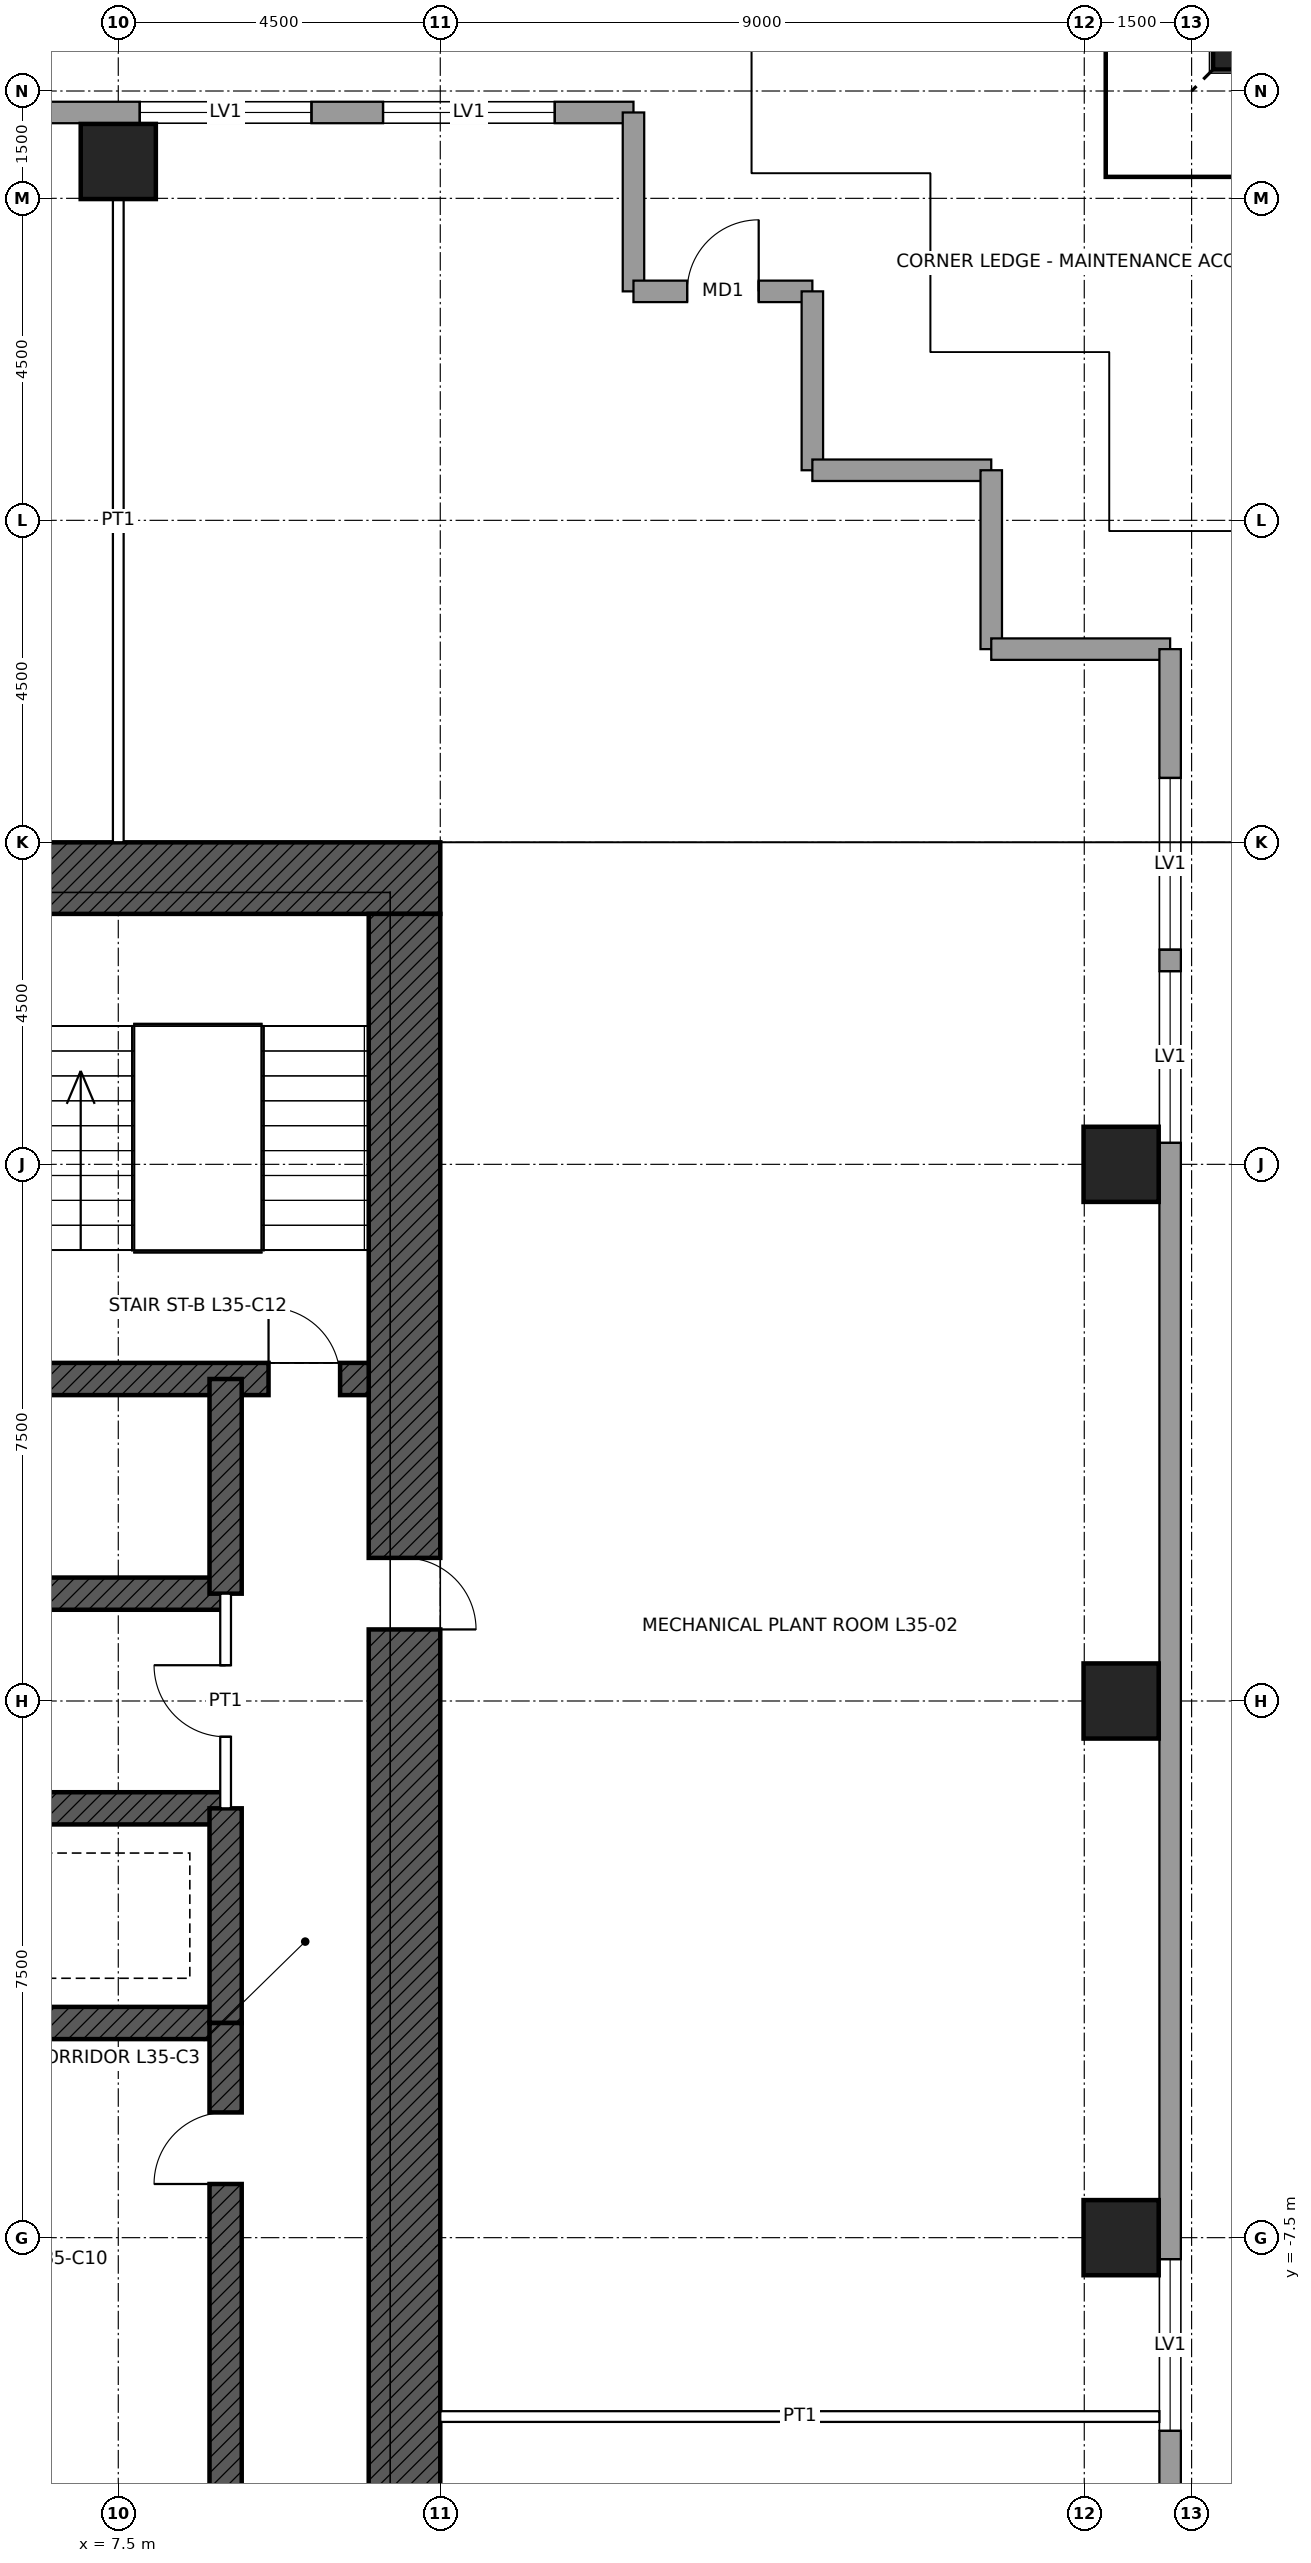
"""IFC4 building model, lengths in metres.
Left out: names, types, materials, properties, quantities, classifications, styles, units other than length and angle.
Written with IfcOpenShell. Run it as: python <this file> out.ifc"""

import sys

from ifc_helpers import new_model, si_unit, direction, frame, frame_2d, origin, origin_2d, place, context, subcontext, project, spatial, rectangle, hollow_rectangle, extrude, clip, halfspace, element, fill, save


model = new_model("IFC4")
c1 = context("Model", 3, precision=1e-05, world=origin(), true_north=direction((0.0, 1.0)))
c2 = subcontext(c1, "Body", "Model", "MODEL_VIEW")
j1 = project(units=[si_unit("LENGTHUNIT", "METRE"), si_unit("PLANEANGLEUNIT", "RADIAN")], contexts=[c1])
p1 = place(None, origin())
s1 = spatial("IfcSite", under=j1, at=p1, CompositionType="ELEMENT")
p2 = place(p1, origin())
s2 = spatial("IfcBuilding", under=s1, at=p2, CompositionType="ELEMENT")
p3 = place(p2, frame((0.0, 0.0, 171.9)))
s3 = spatial("IfcBuildingStorey", under=s2, at=p3, CompositionType="ELEMENT", Elevation=171.9)
p4 = place(p3, frame((24.0, 24.0, 0.0), z_axis=(-0.235702260396, -0.235702260396, 0.942809041582), x_axis=(0.707106781187, -0.707106781187, 0.0)))
e1 = element("IfcColumn", 1, at=p4, inside=s3, PredefinedType="COLUMN", context=c2, shape_type="Clipping", body=[
    clip(clip(extrude(hollow_rectangle(XDim=2.4, YDim=2.4, WallThickness=0.12, at=origin_2d()), origin(), (0.0, 0.0, 1.0), 6.364), halfspace(frame((0.0, 0.0, 0.425)), True)), halfspace(frame((0.0, 0.0, 5.939)), False)),
])
p5 = place(p3, frame((-12.0, 11.5, 0.0), z_axis=(0.0, 0.0, 1.0), x_axis=(1.0, 0.0, 0.0)))
e2 = element("IfcWall", 2, at=p5, inside=s3, PredefinedType="SHEAR", context=c2, shape_type="SweptSolid", body=[
    extrude(rectangle(XDim=24.0, YDim=1.0, at=frame_2d((12.0, 0.0))), origin(), (0.0, 0.0, 1.0), 6.0),
])
p6 = place(p5, frame((6.25, 0.0, 0.0)))
e3 = element("IfcOpeningElement", 3, at=p6, cuts=e2, PredefinedType="OPENING", context=c2, shape_type="SweptSolid", body=[
    extrude(rectangle(XDim=1.0, YDim=2.4, at=frame_2d((0.5, 1.2))), frame((0.0, 0.51, 0.0), z_axis=(0.0, -1.0, 0.0), x_axis=(1.0, 0.0, 0.0)), (0.0, 0.0, 1.0), 1.02),
])
p7 = place(p5, frame((16.75, 0.0, 0.0)))
e4 = element("IfcOpeningElement", 4, at=p7, cuts=e2, PredefinedType="OPENING", context=c2, shape_type="SweptSolid", body=[
    extrude(rectangle(XDim=1.0, YDim=2.4, at=frame_2d((0.5, 1.2))), frame((0.0, 0.51, 0.0), z_axis=(0.0, -1.0, 0.0), x_axis=(1.0, 0.0, 0.0)), (0.0, 0.0, 1.0), 1.02),
])
p8 = place(p3, frame((11.5, 11.0, 0.0), z_axis=(0.0, 0.0, 1.0), x_axis=(0.0, -1.0, 0.0)))
e5 = element("IfcWall", 5, at=p8, inside=s3, PredefinedType="SHEAR", context=c2, shape_type="SweptSolid", body=[
    extrude(rectangle(XDim=22.0, YDim=1.0, at=frame_2d((11.0, 0.0))), origin(), (0.0, 0.0, 1.0), 6.0),
])
p9 = place(p8, frame((9.0, 0.0, 0.0)))
e6 = element("IfcOpeningElement", 6, at=p9, cuts=e5, PredefinedType="OPENING", context=c2, shape_type="SweptSolid", body=[
    extrude(rectangle(XDim=1.0, YDim=2.4, at=frame_2d((0.5, 1.2))), frame((0.0, 0.51, 0.0), z_axis=(0.0, -1.0, 0.0), x_axis=(1.0, 0.0, 0.0)), (0.0, 0.0, 1.0), 1.02),
])
p10 = place(p3, frame((-11.0, 4.5, 0.0), z_axis=(0.0, 0.0, 1.0), x_axis=(1.0, 0.0, 0.0)))
e7 = element("IfcWall", 7, at=p10, inside=s3, PredefinedType="SHEAR", context=c2, shape_type="SweptSolid", body=[
    extrude(rectangle(XDim=22.0, YDim=0.45, at=frame_2d((11.0, 0.0))), origin(), (0.0, 0.0, 1.0), 6.0),
])
p11 = place(p10, frame((0.4, 0.0, 0.0)))
e8 = element("IfcOpeningElement", 8, at=p11, cuts=e7, PredefinedType="OPENING", context=c2, shape_type="SweptSolid", body=[
    extrude(rectangle(XDim=1.0, YDim=2.1, at=frame_2d((0.5, 1.05))), frame((0.0, 0.235, 0.0), z_axis=(0.0, -1.0, 0.0), x_axis=(1.0, 0.0, 0.0)), (0.0, 0.0, 1.0), 0.47),
])
p12 = place(p10, frame((20.6, 0.0, 0.0)))
e9 = element("IfcOpeningElement", 9, at=p12, cuts=e7, PredefinedType="OPENING", context=c2, shape_type="SweptSolid", body=[
    extrude(rectangle(XDim=1.0, YDim=2.1, at=frame_2d((0.5, 1.05))), frame((0.0, 0.235, 0.0), z_axis=(0.0, -1.0, 0.0), x_axis=(1.0, 0.0, 0.0)), (0.0, 0.0, 1.0), 0.47),
])
for number, where, z_axis, x_axis in (
    (10, (-9.0, 1.5, 0.0), (0.0, 0.0, 1.0), (1.0, 0.0, 0.0)),
    (11, (-9.0, -1.5, 0.0), (0.0, 0.0, 1.0), (1.0, 0.0, 0.0)),
    (12, (-9.0, -4.5, 0.0), (0.0, 0.0, 1.0), (1.0, 0.0, 0.0)),
):
    element("IfcWall", number, at=place(p3, frame(where, z_axis=z_axis, x_axis=x_axis)), inside=s3, PredefinedType="SHEAR", context=c2, shape_type="SweptSolid", body=[
        extrude(rectangle(XDim=18.0, YDim=0.45, at=frame_2d((9.0, 0.0))), origin(), (0.0, 0.0, 1.0), 6.0),
    ])
for number, where, z_axis, x_axis in (
    (13, (9.0, 1.5, 0.0), (0.0, 0.0, 1.0), (0.0, 1.0, 0.0)),
    (14, (9.0, -4.5, 0.0), (0.0, 0.0, 1.0), (0.0, 1.0, 0.0)),
):
    element("IfcWall", number, at=place(p3, frame(where, z_axis=z_axis, x_axis=x_axis)), inside=s3, PredefinedType="SHEAR", context=c2, shape_type="SweptSolid", body=[
        extrude(rectangle(XDim=3.0, YDim=0.45, at=frame_2d((1.5, 0.0))), origin(), (0.0, 0.0, 1.0), 6.0),
    ])
p13 = place(p3, frame((9.0, -11.0, 0.0), z_axis=(0.0, 0.0, 1.0), x_axis=(0.0, 1.0, 0.0)))
e15 = element("IfcWall", 15, at=p13, inside=s3, PredefinedType="SHEAR", context=c2, shape_type="SweptSolid", body=[
    extrude(rectangle(XDim=6.5, YDim=0.45, at=frame_2d((3.25, 0.0))), origin(), (0.0, 0.0, 1.0), 6.0),
])
p14 = place(p13, frame((4.25, 0.0, 0.0)))
e16 = element("IfcOpeningElement", 16, at=p14, cuts=e15, PredefinedType="OPENING", context=c2, shape_type="SweptSolid", body=[
    extrude(rectangle(XDim=1.0, YDim=2.1, at=frame_2d((0.5, 1.05))), frame((0.0, 0.235, 0.0), z_axis=(0.0, -1.0, 0.0), x_axis=(1.0, 0.0, 0.0)), (0.0, 0.0, 1.0), 0.47),
])
for number, where, z_axis, x_axis in (
    (17, (7.5, 21.515, -0.25), (0.0, 0.0, 1.0), (1.0, 0.0, 0.0)),
    (18, (21.515, 7.5, -0.25), (0.0, 0.0, 1.0), (1.0, 0.0, 0.0)),
    (19, (21.515, 0.0, -0.25), (0.0, 0.0, 1.0), (1.0, 0.0, 0.0)),
    (20, (21.515, -7.5, -0.25), (0.0, 0.0, 1.0), (1.0, 0.0, 0.0)),
):
    element("IfcColumn", number, at=place(p3, frame(where, z_axis=z_axis, x_axis=x_axis)), inside=s3, PredefinedType="COLUMN", context=c2, shape_type="SweptSolid", body=[
        extrude(hollow_rectangle(XDim=1.05, YDim=1.05, WallThickness=0.07, at=origin_2d()), origin(), (0.0, 0.0, 1.0), 6.25),
    ])
p15 = place(p3, frame((-14.7, 22.2, 0.0), z_axis=(0.0, 0.0, 1.0), x_axis=(1.0, 0.0, 0.0)))
e21 = element("IfcWall", 21, at=p15, inside=s3, PredefinedType="SOLIDWALL", context=c2, shape_type="SweptSolid", body=[
    extrude(rectangle(XDim=29.4, YDim=0.3, at=frame_2d((14.7, 0.0))), origin(), (0.0, 0.0, 1.0), 5.85),
])
p16 = place(p15, frame((1.8, 0.0, 2.1)))
e22 = element("IfcOpeningElement", 22, at=p16, cuts=e21, PredefinedType="OPENING", context=c2, shape_type="SweptSolid", body=[
    extrude(rectangle(XDim=2.4, YDim=2.4, at=frame_2d((1.2, 1.2))), frame((0.0, 0.16, 0.0), z_axis=(0.0, -1.0, 0.0), x_axis=(1.0, 0.0, 0.0)), (0.0, 0.0, 1.0), 0.32),
])
p17 = place(p15, frame((4.5, 0.0, 2.1)))
e23 = element("IfcOpeningElement", 23, at=p17, cuts=e21, PredefinedType="OPENING", context=c2, shape_type="SweptSolid", body=[
    extrude(rectangle(XDim=2.4, YDim=2.4, at=frame_2d((1.2, 1.2))), frame((0.0, 0.16, 0.0), z_axis=(0.0, -1.0, 0.0), x_axis=(1.0, 0.0, 0.0)), (0.0, 0.0, 1.0), 0.32),
])
p18 = place(p15, frame((22.5, 0.0, 2.1)))
e24 = element("IfcOpeningElement", 24, at=p18, cuts=e21, PredefinedType="OPENING", context=c2, shape_type="SweptSolid", body=[
    extrude(rectangle(XDim=2.4, YDim=2.4, at=frame_2d((1.2, 1.2))), frame((0.0, 0.16, 0.0), z_axis=(0.0, -1.0, 0.0), x_axis=(1.0, 0.0, 0.0)), (0.0, 0.0, 1.0), 0.32),
])
p19 = place(p15, frame((25.9, 0.0, 2.1)))
e25 = element("IfcOpeningElement", 25, at=p19, cuts=e21, PredefinedType="OPENING", context=c2, shape_type="SweptSolid", body=[
    extrude(rectangle(XDim=2.4, YDim=2.4, at=frame_2d((1.2, 1.2))), frame((0.0, 0.16, 0.0), z_axis=(0.0, -1.0, 0.0), x_axis=(1.0, 0.0, 0.0)), (0.0, 0.0, 1.0), 0.32),
])
p20 = place(p3, frame((14.7, 22.2, 0.0), z_axis=(0.0, 0.0, 1.0), x_axis=(0.0, -1.0, 0.0)))
e26 = element("IfcWall", 26, at=p20, inside=s3, PredefinedType="SOLIDWALL", context=c2, shape_type="SweptSolid", body=[
    extrude(rectangle(XDim=2.5, YDim=0.3, at=frame_2d((1.25, 0.0))), origin(), (0.0, 0.0, 1.0), 5.85),
])
p21 = place(p3, frame((14.7, 19.7, 0.0), z_axis=(0.0, 0.0, 1.0), x_axis=(1.0, 0.0, 0.0)))
e27 = element("IfcWall", 27, at=p21, inside=s3, PredefinedType="SOLIDWALL", context=c2, shape_type="SweptSolid", body=[
    extrude(rectangle(XDim=2.5, YDim=0.3, at=frame_2d((1.25, 0.0))), origin(), (0.0, 0.0, 1.0), 5.85),
])
p22 = place(p21, frame((0.75, 0.0, 0.0)))
e28 = element("IfcOpeningElement", 28, at=p22, cuts=e27, PredefinedType="OPENING", context=c2, shape_type="SweptSolid", body=[
    extrude(rectangle(XDim=1.0, YDim=2.1, at=frame_2d((0.5, 1.05))), frame((0.0, 0.16, 0.0), z_axis=(0.0, -1.0, 0.0), x_axis=(1.0, 0.0, 0.0)), (0.0, 0.0, 1.0), 0.32),
])
for number, where, z_axis, x_axis in (
    (29, (17.2, 19.7, 0.0), (0.0, 0.0, 1.0), (0.0, -1.0, 0.0)),
    (30, (17.2, 17.2, 0.0), (0.0, 0.0, 1.0), (1.0, 0.0, 0.0)),
    (31, (19.7, 17.2, 0.0), (0.0, 0.0, 1.0), (0.0, -1.0, 0.0)),
    (32, (19.7, 14.7, 0.0), (0.0, 0.0, 1.0), (1.0, 0.0, 0.0)),
):
    element("IfcWall", number, at=place(p3, frame(where, z_axis=z_axis, x_axis=x_axis)), inside=s3, PredefinedType="SOLIDWALL", context=c2, shape_type="SweptSolid", body=[
        extrude(rectangle(XDim=2.5, YDim=0.3, at=frame_2d((1.25, 0.0))), origin(), (0.0, 0.0, 1.0), 5.85),
    ])
p23 = place(p3, frame((22.2, 14.7, 0.0), z_axis=(0.0, 0.0, 1.0), x_axis=(0.0, -1.0, 0.0)))
e33 = element("IfcWall", 33, at=p23, inside=s3, PredefinedType="SOLIDWALL", context=c2, shape_type="SweptSolid", body=[
    extrude(rectangle(XDim=29.4, YDim=0.3, at=frame_2d((14.7, 0.0))), origin(), (0.0, 0.0, 1.0), 5.85),
])
p24 = place(p23, frame((1.8, 0.0, 2.1)))
e34 = element("IfcOpeningElement", 34, at=p24, cuts=e33, PredefinedType="OPENING", context=c2, shape_type="SweptSolid", body=[
    extrude(rectangle(XDim=2.4, YDim=2.4, at=frame_2d((1.2, 1.2))), frame((0.0, 0.16, 0.0), z_axis=(0.0, -1.0, 0.0), x_axis=(1.0, 0.0, 0.0)), (0.0, 0.0, 1.0), 0.32),
])
p25 = place(p23, frame((4.5, 0.0, 2.1)))
e35 = element("IfcOpeningElement", 35, at=p25, cuts=e33, PredefinedType="OPENING", context=c2, shape_type="SweptSolid", body=[
    extrude(rectangle(XDim=2.4, YDim=2.4, at=frame_2d((1.2, 1.2))), frame((0.0, 0.16, 0.0), z_axis=(0.0, -1.0, 0.0), x_axis=(1.0, 0.0, 0.0)), (0.0, 0.0, 1.0), 0.32),
])
p26 = place(p23, frame((22.5, 0.0, 2.1)))
e36 = element("IfcOpeningElement", 36, at=p26, cuts=e33, PredefinedType="OPENING", context=c2, shape_type="SweptSolid", body=[
    extrude(rectangle(XDim=2.4, YDim=2.4, at=frame_2d((1.2, 1.2))), frame((0.0, 0.16, 0.0), z_axis=(0.0, -1.0, 0.0), x_axis=(1.0, 0.0, 0.0)), (0.0, 0.0, 1.0), 0.32),
])
p27 = place(p23, frame((25.9, 0.0, 2.1)))
e37 = element("IfcOpeningElement", 37, at=p27, cuts=e33, PredefinedType="OPENING", context=c2, shape_type="SweptSolid", body=[
    extrude(rectangle(XDim=2.4, YDim=2.4, at=frame_2d((1.2, 1.2))), frame((0.0, 0.16, 0.0), z_axis=(0.0, -1.0, 0.0), x_axis=(1.0, 0.0, 0.0)), (0.0, 0.0, 1.0), 0.32),
])
p28 = place(p3, frame((7.5, 12.0, 0.0), z_axis=(0.0, 0.0, 1.0), x_axis=(0.0, 1.0, 0.0)))
e38 = element("IfcWall", 38, at=p28, inside=s3, PredefinedType="PARTITIONING", context=c2, shape_type="SweptSolid", body=[
    extrude(rectangle(XDim=8.99, YDim=0.15, at=frame_2d((4.495, 0.0))), origin(), (0.0, 0.0, 1.0), 5.85),
])
p29 = place(p3, frame((12.0, -10.0, 0.0), z_axis=(0.0, 0.0, 1.0), x_axis=(1.0, 0.0, 0.0)))
e39 = element("IfcWall", 39, at=p29, inside=s3, PredefinedType="PARTITIONING", context=c2, shape_type="SweptSolid", body=[
    extrude(rectangle(XDim=10.05, YDim=0.15, at=frame_2d((5.025, 0.0))), origin(), (0.0, 0.0, 1.0), 5.85),
])
p30 = place(p3, frame((9.0, -1.5, 0.0), z_axis=(0.0, 0.0, 1.0), x_axis=(0.0, 1.0, 0.0)))
e40 = element("IfcWall", 40, at=p30, inside=s3, PredefinedType="PARTITIONING", context=c2, shape_type="SweptSolid", body=[
    extrude(rectangle(XDim=3.0, YDim=0.15, at=frame_2d((1.5, 0.0))), origin(), (0.0, 0.0, 1.0), 5.75),
])
p31 = place(p30, frame((1.0, 0.0, 0.0)))
e41 = element("IfcOpeningElement", 41, at=p31, cuts=e40, PredefinedType="OPENING", context=c2, shape_type="SweptSolid", body=[
    extrude(rectangle(XDim=1.0, YDim=2.4, at=frame_2d((0.5, 1.2))), frame((0.0, 0.085, 0.0), z_axis=(0.0, -1.0, 0.0), x_axis=(1.0, 0.0, 0.0)), (0.0, 0.0, 1.0), 0.17),
])
p32 = place(p18, origin())
e42 = element("IfcWindow", 42, at=p32, inside=s3, PartitioningType="SINGLE_PANEL", PredefinedType="WINDOW", context=c2, shape_type="SweptSolid", body=[
    extrude(rectangle(XDim=2.4, YDim=2.4, at=frame_2d((1.2, 1.2))), frame((0.0, 0.15, 0.0), z_axis=(0.0, -1.0, 0.0), x_axis=(1.0, 0.0, 0.0)), (0.0, 0.0, 1.0), 0.06),
])
fill(e24, e42)
p33 = place(p19, origin())
e43 = element("IfcWindow", 43, at=p33, inside=s3, PartitioningType="SINGLE_PANEL", PredefinedType="WINDOW", context=c2, shape_type="SweptSolid", body=[
    extrude(rectangle(XDim=2.4, YDim=2.4, at=frame_2d((1.2, 1.2))), frame((0.0, 0.15, 0.0), z_axis=(0.0, -1.0, 0.0), x_axis=(1.0, 0.0, 0.0)), (0.0, 0.0, 1.0), 0.06),
])
fill(e25, e43)
p34 = place(p22, origin())
e44 = element("IfcDoor", 44, at=p34, inside=s3, OperationType="SINGLE_SWING_RIGHT", PredefinedType="DOOR", context=c2, shape_type="SweptSolid", body=[
    extrude(rectangle(XDim=1.0, YDim=2.1, at=frame_2d((0.5, 1.05))), frame((0.0, 0.025, 0.0), z_axis=(0.0, -1.0, 0.0), x_axis=(1.0, 0.0, 0.0)), (0.0, 0.0, 1.0), 0.05),
])
fill(e28, e44)
p35 = place(p24, origin())
e45 = element("IfcWindow", 45, at=p35, inside=s3, PartitioningType="SINGLE_PANEL", PredefinedType="WINDOW", context=c2, shape_type="SweptSolid", body=[
    extrude(rectangle(XDim=2.4, YDim=2.4, at=frame_2d((1.2, 1.2))), frame((0.0, 0.15, 0.0), z_axis=(0.0, -1.0, 0.0), x_axis=(1.0, 0.0, 0.0)), (0.0, 0.0, 1.0), 0.06),
])
fill(e34, e45)
p36 = place(p25, origin())
e46 = element("IfcWindow", 46, at=p36, inside=s3, PartitioningType="SINGLE_PANEL", PredefinedType="WINDOW", context=c2, shape_type="SweptSolid", body=[
    extrude(rectangle(XDim=2.4, YDim=2.4, at=frame_2d((1.2, 1.2))), frame((0.0, 0.15, 0.0), z_axis=(0.0, -1.0, 0.0), x_axis=(1.0, 0.0, 0.0)), (0.0, 0.0, 1.0), 0.06),
])
fill(e35, e46)
p37 = place(p26, origin())
e47 = element("IfcWindow", 47, at=p37, inside=s3, PartitioningType="SINGLE_PANEL", PredefinedType="WINDOW", context=c2, shape_type="SweptSolid", body=[
    extrude(rectangle(XDim=2.4, YDim=2.4, at=frame_2d((1.2, 1.2))), frame((0.0, 0.15, 0.0), z_axis=(0.0, -1.0, 0.0), x_axis=(1.0, 0.0, 0.0)), (0.0, 0.0, 1.0), 0.06),
])
fill(e36, e47)
p38 = place(p12, origin())
e48 = element("IfcDoor", 48, at=p38, inside=s3, OperationType="SINGLE_SWING_LEFT", PredefinedType="DOOR", context=c2, shape_type="SweptSolid", body=[
    extrude(rectangle(XDim=1.0, YDim=2.1, at=frame_2d((0.5, 1.05))), frame((0.0, 0.025, 0.0), z_axis=(0.0, -1.0, 0.0), x_axis=(1.0, 0.0, 0.0)), (0.0, 0.0, 1.0), 0.05),
])
fill(e9, e48)
p39 = place(p9, origin())
e49 = element("IfcDoor", 49, at=p39, inside=s3, OperationType="SINGLE_SWING_RIGHT", PredefinedType="DOOR", context=c2, shape_type="SweptSolid", body=[
    extrude(rectangle(XDim=1.0, YDim=2.4, at=frame_2d((0.5, 1.2))), frame((0.0, 0.485, 0.0), z_axis=(0.0, -1.0, 0.0), x_axis=(1.0, 0.0, 0.0)), (0.0, 0.0, 1.0), 0.05),
])
fill(e6, e49)
p40 = place(p14, origin())
e50 = element("IfcDoor", 50, at=p40, inside=s3, OperationType="SINGLE_SWING_LEFT", PredefinedType="DOOR", context=c2, shape_type="SweptSolid", body=[
    extrude(rectangle(XDim=1.0, YDim=2.1, at=frame_2d((0.5, 1.05))), frame((0.0, 0.025, 0.0), z_axis=(0.0, -1.0, 0.0), x_axis=(1.0, 0.0, 0.0)), (0.0, 0.0, 1.0), 0.05),
])
fill(e16, e50)
p41 = place(p31, origin())
e51 = element("IfcDoor", 51, at=p41, inside=s3, OperationType="SINGLE_SWING_RIGHT", PredefinedType="DOOR", context=c2, shape_type="SweptSolid", body=[
    extrude(rectangle(XDim=1.0, YDim=2.4, at=frame_2d((0.5, 1.2))), frame((0.0, 0.025, 0.0), z_axis=(0.0, -1.0, 0.0), x_axis=(1.0, 0.0, 0.0)), (0.0, 0.0, 1.0), 0.05),
])
fill(e41, e51)
save(model, sys.argv[1])
